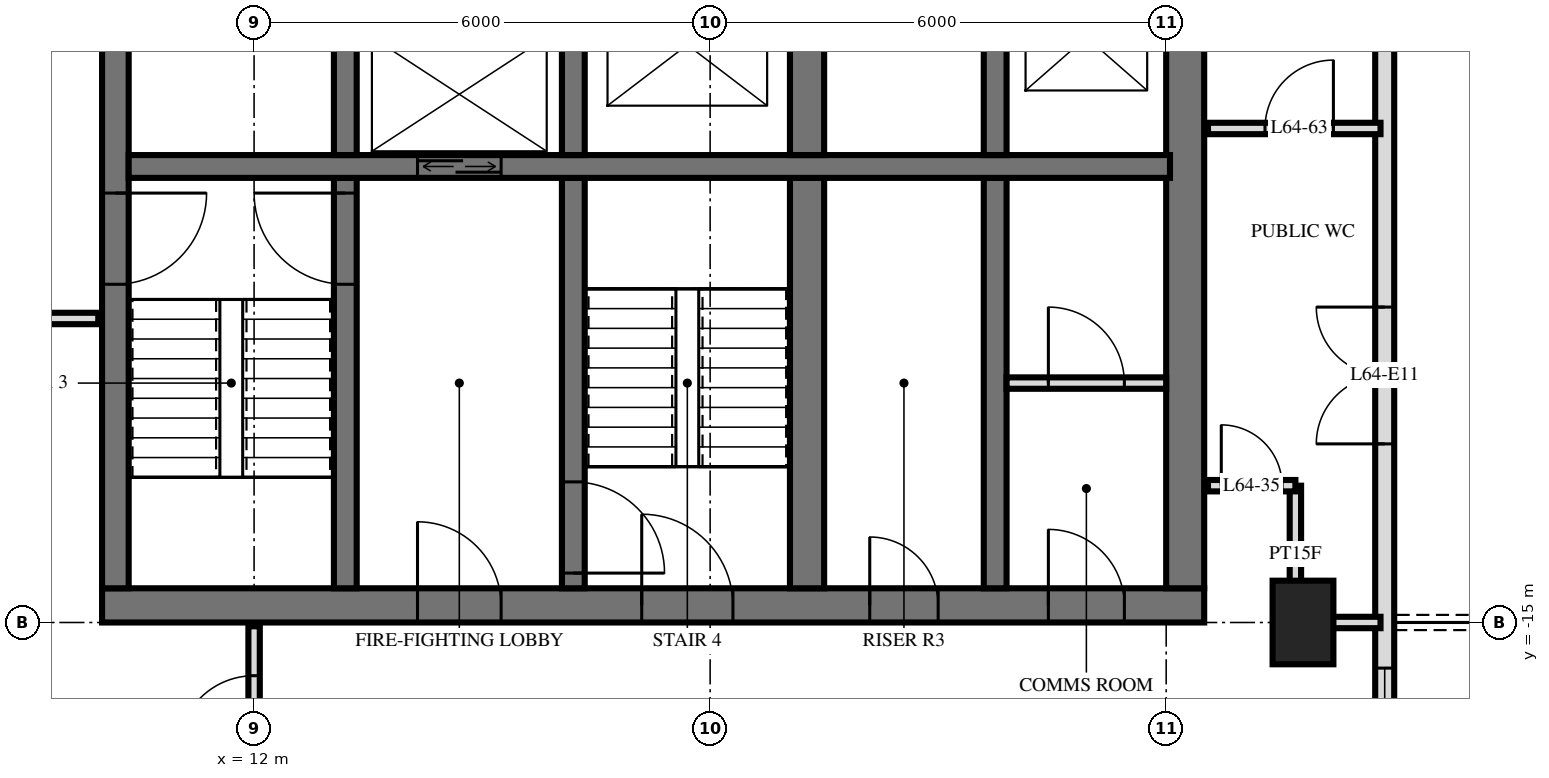
"""IFC4 building model, lengths in metres.
Left out: names, types, materials, properties, quantities, classifications, styles, units other than length and angle.
Written with IfcOpenShell. Run it as: python <this file> out.ifc"""

import sys

from ifc_helpers import new_model, si_unit, direction, frame, frame_2d, origin, origin_2d, place, context, subcontext, project, spatial, rectangle, extrude, element, fill, save


model = new_model("IFC4")
c1 = context("Model", 3, precision=1e-05, world=origin(), true_north=direction((0.0, 1.0)))
c2 = subcontext(c1, "Body", "Model", "MODEL_VIEW")
j1 = project(units=[si_unit("LENGTHUNIT", "METRE"), si_unit("PLANEANGLEUNIT", "RADIAN")], contexts=[c1])
p1 = place(None, origin())
s1 = spatial("IfcSite", under=j1, at=p1, CompositionType="ELEMENT")
p2 = place(p1, origin())
s2 = spatial("IfcBuilding", under=s1, at=p2, CompositionType="ELEMENT")
p3 = place(p2, frame((0.0, 0.0, 243.1)))
s3 = spatial("IfcBuildingStorey", under=s2, at=p3, CompositionType="ELEMENT", Elevation=243.1)
p4 = place(p3, frame((25.8, -15.0, 0.0), z_axis=(0.0, 0.0, 1.0), x_axis=(0.0, 1.0, 0.0)))
e1 = element("IfcColumn", 1, at=p4, inside=s3, PredefinedType="COLUMN", context=c2, shape_type="SweptSolid", body=[
    extrude(rectangle(XDim=1.1, YDim=0.8, at=origin_2d()), origin(), (0.0, 0.0, 1.0), 3.5),
])
p5 = place(p3, frame((10.0, -14.775, 0.0), z_axis=(0.0, 0.0, 1.0), x_axis=(1.0, 0.0, 0.0)))
e2 = element("IfcWall", 2, at=p5, inside=s3, PredefinedType="SHEAR", context=c2, shape_type="SweptSolid", body=[
    extrude(rectangle(XDim=14.5, YDim=0.45, at=frame_2d((7.25, 0.0))), origin(), (0.0, 0.0, 1.0), 3.5),
])
p6 = place(p5, frame((7.1, 0.0, 0.0)))
e3 = element("IfcOpeningElement", 3, at=p6, cuts=e2, PredefinedType="OPENING", context=c2, shape_type="SweptSolid", body=[
    extrude(rectangle(XDim=1.2, YDim=2.1, at=frame_2d((0.6, 1.05))), frame((0.0, 0.235, 0.0), z_axis=(0.0, -1.0, 0.0), x_axis=(1.0, 0.0, 0.0)), (0.0, 0.0, 1.0), 0.47),
])
p7 = place(p5, frame((4.15, 0.0, 0.0)))
e4 = element("IfcOpeningElement", 4, at=p7, cuts=e2, PredefinedType="OPENING", context=c2, shape_type="SweptSolid", body=[
    extrude(rectangle(XDim=1.1, YDim=2.1, at=frame_2d((0.55, 1.05))), frame((0.0, 0.235, 0.0), z_axis=(0.0, -1.0, 0.0), x_axis=(1.0, 0.0, 0.0)), (0.0, 0.0, 1.0), 0.47),
])
p8 = place(p5, frame((10.1, 0.0, 0.0)))
e5 = element("IfcOpeningElement", 5, at=p8, cuts=e2, PredefinedType="OPENING", context=c2, shape_type="SweptSolid", body=[
    extrude(rectangle(XDim=0.9, YDim=2.1, at=frame_2d((0.45, 1.05))), frame((0.0, 0.235, 0.0), z_axis=(0.0, -1.0, 0.0), x_axis=(1.0, 0.0, 0.0)), (0.0, 0.0, 1.0), 0.47),
])
p9 = place(p5, frame((12.45, 0.0, 0.0)))
e6 = element("IfcOpeningElement", 6, at=p9, cuts=e2, PredefinedType="OPENING", context=c2, shape_type="SweptSolid", body=[
    extrude(rectangle(XDim=1.0, YDim=2.1, at=frame_2d((0.5, 1.05))), frame((0.0, 0.235, 0.0), z_axis=(0.0, -1.0, 0.0), x_axis=(1.0, 0.0, 0.0)), (0.0, 0.0, 1.0), 0.47),
])
p10 = place(p3, frame((10.175, -14.55, 0.0), z_axis=(0.0, 0.0, 1.0), x_axis=(0.0, 1.0, 0.0)))
e7 = element("IfcWall", 7, at=p10, inside=s3, PredefinedType="SHEAR", context=c2, shape_type="SweptSolid", body=[
    extrude(rectangle(XDim=14.1, YDim=0.35, at=frame_2d((7.05, 0.0))), origin(), (0.0, 0.0, 1.0), 3.5),
])
p11 = place(p10, frame((8.4, 0.0, 0.0)))
e8 = element("IfcOpeningElement", 8, at=p11, cuts=e7, PredefinedType="OPENING", context=c2, shape_type="SweptSolid", body=[
    extrude(rectangle(XDim=1.4, YDim=2.4, at=frame_2d((0.7, 1.2))), frame((0.0, 0.185, 0.0), z_axis=(0.0, -1.0, 0.0), x_axis=(1.0, 0.0, 0.0)), (0.0, 0.0, 1.0), 0.37),
])
p12 = place(p10, frame((10.0, 0.0, 0.0)))
e9 = element("IfcOpeningElement", 9, at=p12, cuts=e7, PredefinedType="OPENING", context=c2, shape_type="SweptSolid", body=[
    extrude(rectangle(XDim=1.4, YDim=2.4, at=frame_2d((0.7, 1.2))), frame((0.0, 0.185, 0.0), z_axis=(0.0, -1.0, 0.0), x_axis=(1.0, 0.0, 0.0)), (0.0, 0.0, 1.0), 0.37),
])
p13 = place(p10, frame((4.0, 0.0, 0.0)))
e10 = element("IfcOpeningElement", 10, at=p13, cuts=e7, PredefinedType="OPENING", context=c2, shape_type="SweptSolid", body=[
    extrude(rectangle(XDim=1.2, YDim=2.1, at=frame_2d((0.6, 1.05))), frame((0.0, 0.185, 0.0), z_axis=(0.0, -1.0, 0.0), x_axis=(1.0, 0.0, 0.0)), (0.0, 0.0, 1.0), 0.37),
])
p14 = place(p3, frame((24.25, -14.55, 0.0), z_axis=(0.0, 0.0, 1.0), x_axis=(0.0, 1.0, 0.0)))
e11 = element("IfcWall", 11, at=p14, inside=s3, PredefinedType="SHEAR", context=c2, shape_type="SweptSolid", body=[
    extrude(rectangle(XDim=14.1, YDim=0.5, at=frame_2d((7.05, 0.0))), origin(), (0.0, 0.0, 1.0), 3.5),
])
p15 = place(p3, frame((10.35, -9.0, 0.0), z_axis=(0.0, 0.0, 1.0), x_axis=(1.0, 0.0, 0.0)))
e12 = element("IfcWall", 12, at=p15, inside=s3, PredefinedType="SHEAR", context=c2, shape_type="SweptSolid", body=[
    extrude(rectangle(XDim=13.7, YDim=0.3, at=frame_2d((6.85, 0.0))), origin(), (0.0, 0.0, 1.0), 3.5),
])
p16 = place(p15, frame((3.8, 0.0, 0.0)))
e13 = element("IfcOpeningElement", 13, at=p16, cuts=e12, PredefinedType="OPENING", context=c2, shape_type="SweptSolid", body=[
    extrude(rectangle(XDim=1.1, YDim=2.1, at=frame_2d((0.55, 1.05))), frame((0.0, 0.16, 0.0), z_axis=(0.0, -1.0, 0.0), x_axis=(1.0, 0.0, 0.0)), (0.0, 0.0, 1.0), 0.32),
])
p17 = place(p3, frame((13.2, -8.85, 0.0), z_axis=(0.0, 0.0, 1.0), x_axis=(0.0, 1.0, 0.0)))
e14 = element("IfcWall", 14, at=p17, inside=s3, PredefinedType="SHEAR", context=c2, shape_type="SweptSolid", body=[
    extrude(rectangle(XDim=2.3, YDim=0.3, at=frame_2d((1.15, 0.0))), origin(), (0.0, 0.0, 1.0), 3.5),
])
p18 = place(p3, frame((13.2, -14.55, 0.0), z_axis=(0.0, 0.0, 1.0), x_axis=(0.0, 1.0, 0.0)))
e15 = element("IfcWall", 15, at=p18, inside=s3, PredefinedType="SHEAR", context=c2, shape_type="SweptSolid", body=[
    extrude(rectangle(XDim=5.4, YDim=0.3, at=frame_2d((2.7, 0.0))), origin(), (0.0, 0.0, 1.0), 3.5),
])
p19 = place(p18, frame((4.0, 0.0, 0.0)))
e16 = element("IfcOpeningElement", 16, at=p19, cuts=e15, PredefinedType="OPENING", context=c2, shape_type="SweptSolid", body=[
    extrude(rectangle(XDim=1.2, YDim=2.1, at=frame_2d((0.6, 1.05))), frame((0.0, 0.16, 0.0), z_axis=(0.0, -1.0, 0.0), x_axis=(1.0, 0.0, 0.0)), (0.0, 0.0, 1.0), 0.32),
])
p20 = place(p3, frame((16.2, -8.85, 0.0), z_axis=(0.0, 0.0, 1.0), x_axis=(0.0, 1.0, 0.0)))
e17 = element("IfcWall", 17, at=p20, inside=s3, PredefinedType="SHEAR", context=c2, shape_type="SweptSolid", body=[
    extrude(rectangle(XDim=2.3, YDim=0.3, at=frame_2d((1.15, 0.0))), origin(), (0.0, 0.0, 1.0), 3.5),
])
p21 = place(p3, frame((16.2, -14.55, 0.0), z_axis=(0.0, 0.0, 1.0), x_axis=(0.0, 1.0, 0.0)))
e18 = element("IfcWall", 18, at=p21, inside=s3, PredefinedType="SHEAR", context=c2, shape_type="SweptSolid", body=[
    extrude(rectangle(XDim=5.4, YDim=0.3, at=frame_2d((2.7, 0.0))), origin(), (0.0, 0.0, 1.0), 3.5),
])
p22 = place(p21, frame((0.2, 0.0, 0.0)))
e19 = element("IfcOpeningElement", 19, at=p22, cuts=e18, PredefinedType="OPENING", context=c2, shape_type="SweptSolid", body=[
    extrude(rectangle(XDim=1.2, YDim=2.1, at=frame_2d((0.6, 1.05))), frame((0.0, 0.16, 0.0), z_axis=(0.0, -1.0, 0.0), x_axis=(1.0, 0.0, 0.0)), (0.0, 0.0, 1.0), 0.32),
])
p23 = place(p3, frame((19.275, -8.85, 0.0), z_axis=(0.0, 0.0, 1.0), x_axis=(0.0, 1.0, 0.0)))
e20 = element("IfcWall", 20, at=p23, inside=s3, PredefinedType="SHEAR", context=c2, shape_type="SweptSolid", body=[
    extrude(rectangle(XDim=2.3, YDim=0.45, at=frame_2d((1.15, 0.0))), origin(), (0.0, 0.0, 1.0), 3.5),
])
p24 = place(p3, frame((19.275, -14.55, 0.0), z_axis=(0.0, 0.0, 1.0), x_axis=(0.0, 1.0, 0.0)))
e21 = element("IfcWall", 21, at=p24, inside=s3, PredefinedType="SHEAR", context=c2, shape_type="SweptSolid", body=[
    extrude(rectangle(XDim=5.4, YDim=0.45, at=frame_2d((2.7, 0.0))), origin(), (0.0, 0.0, 1.0), 3.5),
])
p25 = place(p3, frame((21.75, -8.85, 0.0), z_axis=(0.0, 0.0, 1.0), x_axis=(0.0, 1.0, 0.0)))
e22 = element("IfcWall", 22, at=p25, inside=s3, PredefinedType="SHEAR", context=c2, shape_type="SweptSolid", body=[
    extrude(rectangle(XDim=2.3, YDim=0.3, at=frame_2d((1.15, 0.0))), origin(), (0.0, 0.0, 1.0), 3.5),
])
p26 = place(p3, frame((21.75, -14.55, 0.0), z_axis=(0.0, 0.0, 1.0), x_axis=(0.0, 1.0, 0.0)))
e23 = element("IfcWall", 23, at=p26, inside=s3, PredefinedType="SHEAR", context=c2, shape_type="SweptSolid", body=[
    extrude(rectangle(XDim=5.4, YDim=0.3, at=frame_2d((2.7, 0.0))), origin(), (0.0, 0.0, 1.0), 3.5),
])
p27 = place(p3, frame((26.875, -24.875, 0.0), z_axis=(0.0, 0.0, 1.0), x_axis=(0.0, 1.0, 0.0)))
e24 = element("IfcWall", 24, at=p27, inside=s3, PredefinedType="SOLIDWALL", context=c2, shape_type="SweptSolid", body=[
    extrude(rectangle(XDim=21.551, YDim=0.25, at=frame_2d((10.775, 0.0))), origin(), (0.0, 0.0, 1.0), 3.2),
])
p28 = place(p27, frame((0.575, 0.0, 0.0)))
e25 = element("IfcOpeningElement", 25, at=p28, cuts=e24, PredefinedType="OPENING", context=c2, shape_type="SweptSolid", body=[
    extrude(rectangle(XDim=1.8, YDim=2.4, at=frame_2d((0.9, 1.2))), frame((0.0, 0.135, 0.0), z_axis=(0.0, -1.0, 0.0), x_axis=(1.0, 0.0, 0.0)), (0.0, 0.0, 1.0), 0.27),
])
p29 = place(p27, frame((4.475, 0.0, 0.0)))
e26 = element("IfcOpeningElement", 26, at=p29, cuts=e24, PredefinedType="OPENING", context=c2, shape_type="SweptSolid", body=[
    extrude(rectangle(XDim=1.8, YDim=2.4, at=frame_2d((0.9, 1.2))), frame((0.0, 0.135, 0.0), z_axis=(0.0, -1.0, 0.0), x_axis=(1.0, 0.0, 0.0)), (0.0, 0.0, 1.0), 0.27),
])
p30 = place(p27, frame((8.075, 0.0, 0.9)))
e27 = element("IfcOpeningElement", 27, at=p30, cuts=e24, PredefinedType="OPENING", context=c2, shape_type="SweptSolid", body=[
    extrude(rectangle(XDim=1.2, YDim=1.5, at=frame_2d((0.6, 0.75))), frame((0.0, 0.135, 0.0), z_axis=(0.0, -1.0, 0.0), x_axis=(1.0, 0.0, 0.0)), (0.0, 0.0, 1.0), 0.27),
])
p31 = place(p27, frame((12.225, 0.0, 0.0)))
e28 = element("IfcOpeningElement", 28, at=p31, cuts=e24, PredefinedType="OPENING", context=c2, shape_type="SweptSolid", body=[
    extrude(rectangle(XDim=1.8, YDim=2.4, at=frame_2d((0.9, 1.2))), frame((0.0, 0.135, 0.0), z_axis=(0.0, -1.0, 0.0), x_axis=(1.0, 0.0, 0.0)), (0.0, 0.0, 1.0), 0.27),
])
p32 = place(p3, frame((21.9, -11.85, 0.0), z_axis=(0.0, 0.0, 1.0), x_axis=(1.0, 0.0, 0.0)))
e29 = element("IfcWall", 29, at=p32, inside=s3, PredefinedType="PARTITIONING", context=c2, shape_type="SweptSolid", body=[
    extrude(rectangle(XDim=2.1, YDim=0.15, at=frame_2d((1.05, 0.0))), origin(), (0.0, 0.0, 1.0), 3.2),
])
p33 = place(p32, frame((0.55, 0.0, 0.0)))
e30 = element("IfcOpeningElement", 30, at=p33, cuts=e29, PredefinedType="OPENING", context=c2, shape_type="SweptSolid", body=[
    extrude(rectangle(XDim=1.0, YDim=2.1, at=frame_2d((0.5, 1.05))), frame((0.0, 0.085, 0.0), z_axis=(0.0, -1.0, 0.0), x_axis=(1.0, 0.0, 0.0)), (0.0, 0.0, 1.0), 0.17),
])
p34 = place(p3, frame((25.7, -15.0, 0.0), z_axis=(0.0, 0.0, 1.0), x_axis=(0.0, 1.0, 0.0)))
e31 = element("IfcWall", 31, at=p34, inside=s3, PredefinedType="PARTITIONING", context=c2, shape_type="SweptSolid", body=[
    extrude(rectangle(XDim=1.8, YDim=0.15, at=frame_2d((0.9, 0.0))), origin(), (0.0, 0.0, 1.0), 3.22),
])
p35 = place(p3, frame((12.0, -17.4, 0.0), z_axis=(0.0, 0.0, 1.0), x_axis=(0.0, 1.0, 0.0)))
e32 = element("IfcWall", 32, at=p35, inside=s3, PredefinedType="PARTITIONING", context=c2, shape_type="SweptSolid", body=[
    extrude(rectangle(XDim=2.35, YDim=0.15, at=frame_2d((1.175, 0.0))), origin(), (0.0, 0.0, 1.0), 3.22),
])
p36 = place(p35, frame((0.7, 0.0, 0.0)))
e33 = element("IfcOpeningElement", 33, at=p36, cuts=e32, PredefinedType="OPENING", context=c2, shape_type="SweptSolid", body=[
    extrude(rectangle(XDim=1.0, YDim=2.1, at=frame_2d((0.5, 1.05))), frame((0.0, 0.085, 0.0), z_axis=(0.0, -1.0, 0.0), x_axis=(1.0, 0.0, 0.0)), (0.0, 0.0, 1.0), 0.17),
])
p37 = place(p3, frame((25.7, -15.0, 0.0), z_axis=(0.0, 0.0, 1.0), x_axis=(1.0, 0.0, 0.0)))
e34 = element("IfcWall", 34, at=p37, inside=s3, PredefinedType="PARTITIONING", context=c2, shape_type="SweptSolid", body=[
    extrude(rectangle(XDim=1.12, YDim=0.15, at=frame_2d((0.56, 0.0))), origin(), (0.0, 0.0, 1.0), 3.22),
])
p38 = place(p3, frame((24.55, -13.2, 0.0), z_axis=(0.0, 0.0, 1.0), x_axis=(1.0, 0.0, 0.0)))
e35 = element("IfcWall", 35, at=p38, inside=s3, PredefinedType="PARTITIONING", context=c2, shape_type="SweptSolid", body=[
    extrude(rectangle(XDim=1.15, YDim=0.15, at=frame_2d((0.575, 0.0))), origin(), (0.0, 0.0, 1.0), 3.22),
])
p39 = place(p38, frame((0.175, 0.0, 0.0)))
e36 = element("IfcOpeningElement", 36, at=p39, cuts=e35, PredefinedType="OPENING", context=c2, shape_type="SweptSolid", body=[
    extrude(rectangle(XDim=0.8, YDim=2.1, at=frame_2d((0.4, 1.05))), frame((0.0, 0.085, 0.0), z_axis=(0.0, -1.0, 0.0), x_axis=(1.0, 0.0, 0.0)), (0.0, 0.0, 1.0), 0.17),
])
p40 = place(p3, frame((-9.95, -11.0, 0.0), z_axis=(0.0, 0.0, 1.0), x_axis=(1.0, 0.0, 0.0)))
e37 = element("IfcWall", 37, at=p40, inside=s3, PredefinedType="PARTITIONING", context=c2, shape_type="SweptSolid", body=[
    extrude(rectangle(XDim=19.9, YDim=0.15, at=frame_2d((9.95, 0.0))), origin(), (0.0, 0.0, 1.0), 3.22),
])
p41 = place(p40, frame((9.45, 0.0, 0.0)))
e38 = element("IfcOpeningElement", 38, at=p41, cuts=e37, PredefinedType="OPENING", context=c2, shape_type="SweptSolid", body=[
    extrude(rectangle(XDim=1.0, YDim=2.1, at=frame_2d((0.5, 1.05))), frame((0.0, 0.085, 0.0), z_axis=(0.0, -1.0, 0.0), x_axis=(1.0, 0.0, 0.0)), (0.0, 0.0, 1.0), 0.17),
])
p42 = place(p40, frame((3.45, 0.0, 0.0)))
e39 = element("IfcOpeningElement", 39, at=p42, cuts=e37, PredefinedType="OPENING", context=c2, shape_type="SweptSolid", body=[
    extrude(rectangle(XDim=1.0, YDim=2.1, at=frame_2d((0.5, 1.05))), frame((0.0, 0.085, 0.0), z_axis=(0.0, -1.0, 0.0), x_axis=(1.0, 0.0, 0.0)), (0.0, 0.0, 1.0), 0.17),
])
p43 = place(p3, frame((24.55, -8.5, 0.0), z_axis=(0.0, 0.0, 1.0), x_axis=(1.0, 0.0, 0.0)))
e40 = element("IfcWall", 40, at=p43, inside=s3, PredefinedType="PLUMBINGWALL", context=c2, shape_type="SweptSolid", body=[
    extrude(rectangle(XDim=2.27, YDim=0.15, at=frame_2d((1.135, 0.0))), origin(), (0.0, 0.0, 1.0), 3.22),
])
p44 = place(p43, frame((0.75, 0.0, 0.0)))
e41 = element("IfcOpeningElement", 41, at=p44, cuts=e40, PredefinedType="OPENING", context=c2, shape_type="SweptSolid", body=[
    extrude(rectangle(XDim=0.9, YDim=2.1, at=frame_2d((0.45, 1.05))), frame((0.0, 0.085, 0.0), z_axis=(0.0, -1.0, 0.0), x_axis=(1.0, 0.0, 0.0)), (0.0, 0.0, 1.0), 0.17),
])
p45 = place(p30, origin())
e42 = element("IfcWindow", 42, at=p45, inside=s3, PartitioningType="SINGLE_PANEL", PredefinedType="WINDOW", context=c2, shape_type="SweptSolid", body=[
    extrude(rectangle(XDim=1.2, YDim=1.5, at=frame_2d((0.6, 0.75))), frame((0.0, 0.03, 0.0), z_axis=(0.0, -1.0, 0.0), x_axis=(1.0, 0.0, 0.0)), (0.0, 0.0, 1.0), 0.06),
])
fill(e27, e42)
p46 = place(p31, origin())
e43 = element("IfcDoor", 43, at=p46, inside=s3, OperationType="DOUBLE_DOOR_SINGLE_SWING", PredefinedType="DOOR", context=c2, shape_type="SweptSolid", body=[
    extrude(rectangle(XDim=1.8, YDim=2.4, at=frame_2d((0.9, 1.2))), frame((0.0, 0.025, 0.0), z_axis=(0.0, -1.0, 0.0), x_axis=(1.0, 0.0, 0.0)), (0.0, 0.0, 1.0), 0.05),
])
fill(e28, e43)
p47 = place(p16, origin())
e44 = element("IfcDoor", 44, at=p47, inside=s3, OperationType="DOUBLE_DOOR_SLIDING", PredefinedType="USERDEFINED", context=c2, shape_type="SweptSolid", body=[
    extrude(rectangle(XDim=1.1, YDim=2.1, at=frame_2d((0.55, 1.05))), frame((0.0, 0.025, 0.0), z_axis=(0.0, -1.0, 0.0), x_axis=(1.0, 0.0, 0.0)), (0.0, 0.0, 1.0), 0.05),
])
fill(e13, e44)
p48 = place(p13, frame((0.6, 0.0, 0.0), z_axis=(0.0, 0.0, 1.0), x_axis=(-1.0, 0.0, 0.0)))
e45 = element("IfcDoor", 45, at=p48, inside=s3, OperationType="SINGLE_SWING_RIGHT", PredefinedType="DOOR", context=c2, shape_type="SweptSolid", body=[
    extrude(rectangle(XDim=1.2, YDim=2.1, at=frame_2d((0.0, 1.05))), frame((0.0, -0.025, 0.0), z_axis=(0.0, 1.0, 0.0), x_axis=(-1.0, 0.0, 0.0)), (0.0, 0.0, 1.0), 0.05),
])
fill(e10, e45)
p49 = place(p6, origin())
e46 = element("IfcDoor", 46, at=p49, inside=s3, OperationType="SINGLE_SWING_RIGHT", PredefinedType="DOOR", context=c2, shape_type="SweptSolid", body=[
    extrude(rectangle(XDim=1.2, YDim=2.1, at=frame_2d((0.6, 1.05))), frame((0.0, 0.025, 0.0), z_axis=(0.0, -1.0, 0.0), x_axis=(1.0, 0.0, 0.0)), (0.0, 0.0, 1.0), 0.05),
])
fill(e3, e46)
p50 = place(p7, origin())
e47 = element("IfcDoor", 47, at=p50, inside=s3, OperationType="SINGLE_SWING_RIGHT", PredefinedType="DOOR", context=c2, shape_type="SweptSolid", body=[
    extrude(rectangle(XDim=1.1, YDim=2.1, at=frame_2d((0.55, 1.05))), frame((0.0, 0.025, 0.0), z_axis=(0.0, -1.0, 0.0), x_axis=(1.0, 0.0, 0.0)), (0.0, 0.0, 1.0), 0.05),
])
fill(e4, e47)
p51 = place(p8, origin())
e48 = element("IfcDoor", 48, at=p51, inside=s3, OperationType="SINGLE_SWING_RIGHT", PredefinedType="DOOR", context=c2, shape_type="SweptSolid", body=[
    extrude(rectangle(XDim=0.9, YDim=2.1, at=frame_2d((0.45, 1.05))), frame((0.0, 0.025, 0.0), z_axis=(0.0, -1.0, 0.0), x_axis=(1.0, 0.0, 0.0)), (0.0, 0.0, 1.0), 0.05),
])
fill(e5, e48)
p52 = place(p9, origin())
e49 = element("IfcDoor", 49, at=p52, inside=s3, OperationType="SINGLE_SWING_RIGHT", PredefinedType="DOOR", context=c2, shape_type="SweptSolid", body=[
    extrude(rectangle(XDim=1.0, YDim=2.1, at=frame_2d((0.5, 1.05))), frame((0.0, 0.025, 0.0), z_axis=(0.0, -1.0, 0.0), x_axis=(1.0, 0.0, 0.0)), (0.0, 0.0, 1.0), 0.05),
])
fill(e6, e49)
p53 = place(p19, origin())
e50 = element("IfcDoor", 50, at=p53, inside=s3, OperationType="SINGLE_SWING_LEFT", PredefinedType="DOOR", context=c2, shape_type="SweptSolid", body=[
    extrude(rectangle(XDim=1.2, YDim=2.1, at=frame_2d((0.6, 1.05))), frame((0.0, 0.025, 0.0), z_axis=(0.0, -1.0, 0.0), x_axis=(1.0, 0.0, 0.0)), (0.0, 0.0, 1.0), 0.05),
])
fill(e16, e50)
p54 = place(p22, frame((0.6, 0.0, 0.0), z_axis=(0.0, 0.0, 1.0), x_axis=(-1.0, 0.0, 0.0)))
e51 = element("IfcDoor", 51, at=p54, inside=s3, OperationType="SINGLE_SWING_LEFT", PredefinedType="DOOR", context=c2, shape_type="SweptSolid", body=[
    extrude(rectangle(XDim=1.2, YDim=2.1, at=frame_2d((0.0, 1.05))), frame((0.0, -0.025, 0.0), z_axis=(0.0, 1.0, 0.0), x_axis=(-1.0, 0.0, 0.0)), (0.0, 0.0, 1.0), 0.05),
])
fill(e19, e51)
p55 = place(p33, origin())
e52 = element("IfcDoor", 52, at=p55, inside=s3, OperationType="SINGLE_SWING_RIGHT", PredefinedType="DOOR", context=c2, shape_type="SweptSolid", body=[
    extrude(rectangle(XDim=1.0, YDim=2.1, at=frame_2d((0.5, 1.05))), frame((0.0, 0.025, 0.0), z_axis=(0.0, -1.0, 0.0), x_axis=(1.0, 0.0, 0.0)), (0.0, 0.0, 1.0), 0.05),
])
fill(e30, e52)
p56 = place(p36, origin())
e53 = element("IfcDoor", 53, at=p56, inside=s3, OperationType="SINGLE_SWING_RIGHT", PredefinedType="DOOR", context=c2, shape_type="SweptSolid", body=[
    extrude(rectangle(XDim=1.0, YDim=2.1, at=frame_2d((0.5, 1.05))), frame((0.0, 0.025, 0.0), z_axis=(0.0, -1.0, 0.0), x_axis=(1.0, 0.0, 0.0)), (0.0, 0.0, 1.0), 0.05),
])
fill(e33, e53)
p57 = place(p39, origin())
e54 = element("IfcDoor", 54, at=p57, inside=s3, OperationType="SINGLE_SWING_RIGHT", PredefinedType="DOOR", context=c2, shape_type="SweptSolid", body=[
    extrude(rectangle(XDim=0.8, YDim=2.1, at=frame_2d((0.4, 1.05))), frame((0.0, 0.025, 0.0), z_axis=(0.0, -1.0, 0.0), x_axis=(1.0, 0.0, 0.0)), (0.0, 0.0, 1.0), 0.05),
])
fill(e36, e54)
p58 = place(p44, origin())
e55 = element("IfcDoor", 55, at=p58, inside=s3, OperationType="SINGLE_SWING_LEFT", PredefinedType="DOOR", context=c2, shape_type="SweptSolid", body=[
    extrude(rectangle(XDim=0.9, YDim=2.1, at=frame_2d((0.45, 1.05))), frame((0.0, 0.025, 0.0), z_axis=(0.0, -1.0, 0.0), x_axis=(1.0, 0.0, 0.0)), (0.0, 0.0, 1.0), 0.05),
])
fill(e41, e55)
save(model, sys.argv[1])
